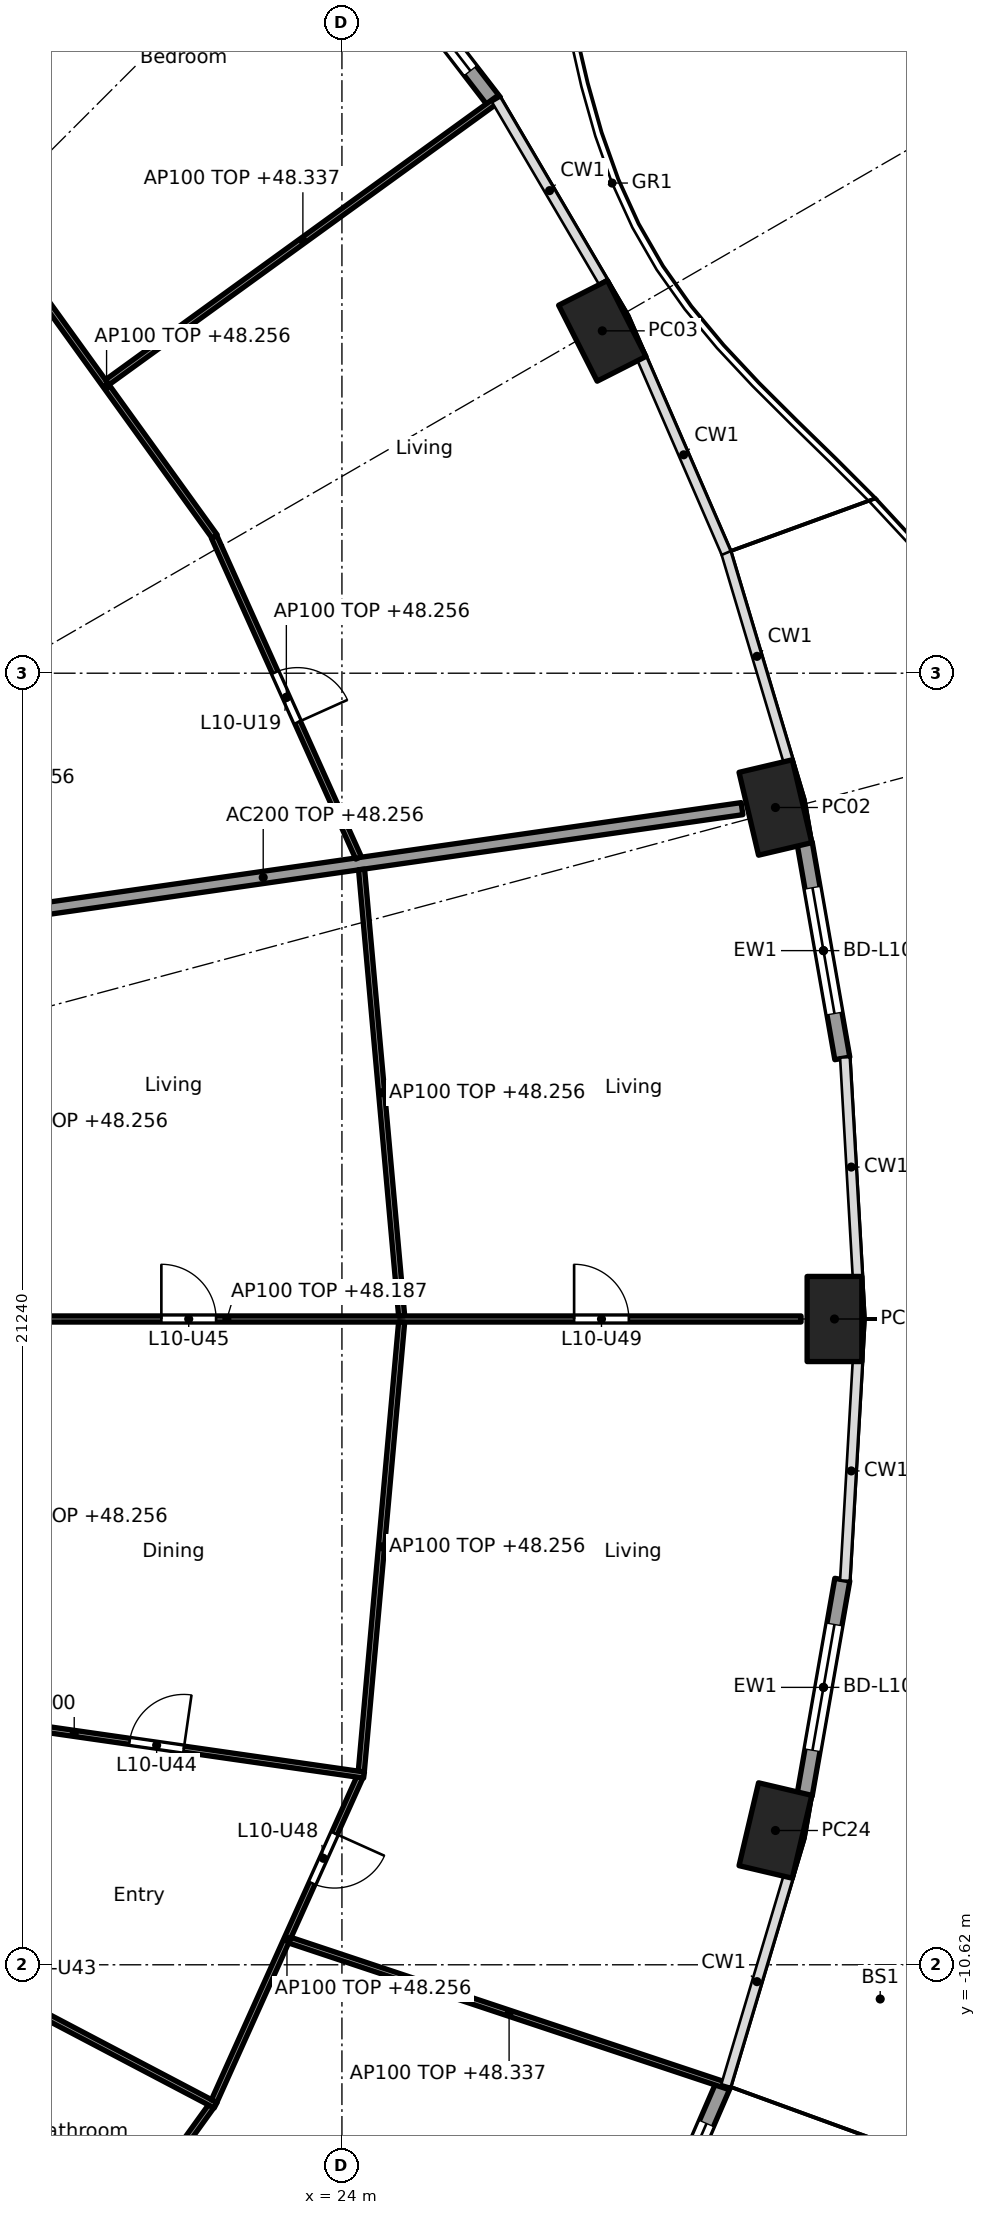
"""IFC4 building model, lengths in metres.
Left out: names, types, materials, properties, quantities, classifications, styles, units other than length and angle.
Written with IfcOpenShell. Run it as: python <this file> out.ifc"""

import sys

from ifc_helpers import new_model, si_unit, direction, frame, frame_2d, origin, origin_2d, place, context, subcontext, project, spatial, rectangle, hollow_rectangle, extrude, element, fill, save


model = new_model("IFC4")
c1 = context("Model", 3, precision=1e-05, world=origin(), true_north=direction((0.0, 1.0)))
c2 = subcontext(c1, "Body", "Model", "MODEL_VIEW")
j1 = project(units=[si_unit("LENGTHUNIT", "METRE"), si_unit("PLANEANGLEUNIT", "RADIAN")], contexts=[c1])
p1 = place(None, origin())
s1 = spatial("IfcSite", under=j1, at=p1, CompositionType="ELEMENT")
p2 = place(p1, origin())
s2 = spatial("IfcBuilding", under=s1, at=p2, CompositionType="ELEMENT")
p3 = place(p2, frame((0.0, 0.0, 45.5)))
s3 = spatial("IfcBuildingStorey", under=s2, at=p3, CompositionType="ELEMENT", Elevation=45.5)
for number, where, z_axis, x_axis in (
    (1, (32.1, 0.0, 0.0), (0.0, 0.0, 1.0), (0.0, 1.0, 0.0)),
    (2, (31.129, 8.412, 0.0), (0.0, 0.0, 1.0), (-0.229, 0.973, 0.0)),
    (3, (28.282, 16.25, 0.0), (0.0, 0.0, 1.0), (-0.452, 0.892, 0.0)),
    (4, (31.129, -8.412, 0.0), (0.0, 0.0, 1.0), (0.229, 0.973, 0.0)),
):
    element("IfcColumn", number, at=place(p3, frame(where, z_axis=z_axis, x_axis=x_axis)), inside=s3, PredefinedType="COLUMN", context=c2, shape_type="SweptSolid", body=[
        extrude(hollow_rectangle(XDim=1.4, YDim=0.9, WallThickness=0.05, at=origin_2d()), origin(), (0.0, 0.0, 1.0), 3.7),
    ])
p4 = place(p3, frame((31.609, 7.83, 0.0), z_axis=(0.0, 0.0, 1.0), x_axis=(0.172217377323, -0.98505897029, 0.0)))
e5 = element("IfcWall", 5, at=p4, inside=s3, PredefinedType="SOLIDWALL", context=c2, shape_type="SweptSolid", body=[
    extrude(rectangle(XDim=3.598, YDim=0.25, at=frame_2d((1.799, 0.0))), origin(), (0.0, 0.0, 1.0), 3.44),
])
p5 = place(p4, frame((0.749, 0.0, 0.0)))
e6 = element("IfcOpeningElement", 6, at=p5, cuts=e5, PredefinedType="OPENING", context=c2, shape_type="SweptSolid", body=[
    extrude(rectangle(XDim=2.1, YDim=2.4, at=frame_2d((1.05, 1.2))), frame((0.0, 0.135, 0.0), z_axis=(0.0, -1.0, 0.0), x_axis=(1.0, 0.0, 0.0)), (0.0, 0.0, 1.0), 0.27),
])
p6 = place(p3, frame((24.434, 22.704, 0.0), z_axis=(0.0, 0.0, 1.0), x_axis=(0.610457147657, -0.792049285635, 0.0)))
e7 = element("IfcWall", 7, at=p6, inside=s3, PredefinedType="SOLIDWALL", context=c2, shape_type="SweptSolid", body=[
    extrude(rectangle(XDim=3.397, YDim=0.25, at=frame_2d((1.699, 0.0))), origin(), (0.0, 0.0, 1.0), 3.44),
])
p7 = place(p6, frame((0.649, 0.0, 0.0)))
e8 = element("IfcOpeningElement", 8, at=p7, cuts=e7, PredefinedType="OPENING", context=c2, shape_type="SweptSolid", body=[
    extrude(rectangle(XDim=2.1, YDim=2.4, at=frame_2d((1.05, 1.2))), frame((0.0, 0.135, 0.0), z_axis=(0.0, -1.0, 0.0), x_axis=(1.0, 0.0, 0.0)), (0.0, 0.0, 1.0), 0.27),
])
p8 = place(p3, frame((30.278, -12.579, 0.0), z_axis=(0.0, 0.0, 1.0), x_axis=(-0.397624958345, -0.917548032803, 0.0)))
e9 = element("IfcWall", 9, at=p8, inside=s3, PredefinedType="SOLIDWALL", context=c2, shape_type="SweptSolid", body=[
    extrude(rectangle(XDim=3.52, YDim=0.25, at=frame_2d((1.76, 0.0))), origin(), (0.0, 0.0, 1.0), 3.44),
])
p9 = place(p8, frame((0.71, 0.0, 0.0)))
e10 = element("IfcOpeningElement", 10, at=p9, cuts=e9, PredefinedType="OPENING", context=c2, shape_type="SweptSolid", body=[
    extrude(rectangle(XDim=2.1, YDim=2.4, at=frame_2d((1.05, 1.2))), frame((0.0, 0.135, 0.0), z_axis=(0.0, -1.0, 0.0), x_axis=(1.0, 0.0, 0.0)), (0.0, 0.0, 1.0), 0.27),
])
p10 = place(p3, frame((32.229, -4.286, 0.0), z_axis=(0.0, 0.0, 1.0), x_axis=(-0.172217377323, -0.98505897029, 0.0)))
e11 = element("IfcWall", 11, at=p10, inside=s3, PredefinedType="SOLIDWALL", context=c2, shape_type="SweptSolid", body=[
    extrude(rectangle(XDim=3.598, YDim=0.25, at=frame_2d((1.799, 0.0))), origin(), (0.0, 0.0, 1.0), 3.44),
])
p11 = place(p10, frame((0.749, 0.0, 0.0)))
e12 = element("IfcOpeningElement", 12, at=p11, cuts=e11, PredefinedType="OPENING", context=c2, shape_type="SweptSolid", body=[
    extrude(rectangle(XDim=2.1, YDim=2.4, at=frame_2d((1.05, 1.2))), frame((0.0, 0.135, 0.0), z_axis=(0.0, -1.0, 0.0), x_axis=(1.0, 0.0, 0.0)), (0.0, 0.0, 1.0), 0.27),
])
p12 = place(p3, frame((14.832, 6.13, 0.0), z_axis=(0.0, 0.0, 1.0), x_axis=(0.989836541293, 0.142209779978, 0.0)))
e13 = element("IfcWall", 13, at=p12, inside=s3, PredefinedType="PARTITIONING", context=c2, shape_type="SweptSolid", body=[
    extrude(rectangle(XDim=15.909, YDim=0.2, at=frame_2d((7.955, 0.0))), origin(), (0.0, 0.0, 1.0), 2.756),
])
p13 = place(p3, frame((12.665, 0.0, 0.0), z_axis=(0.0, 0.0, 1.0), x_axis=(1.0, 0.0, 0.0)))
e14 = element("IfcWall", 14, at=p13, inside=s3, PredefinedType="PARTITIONING", context=c2, shape_type="SweptSolid", body=[
    extrude(rectangle(XDim=18.885, YDim=0.1, at=frame_2d((9.443, 0.0))), origin(), (0.0, 0.0, 1.0), 2.687),
])
p14 = place(p13, frame((2.205, 0.0, 0.0)))
e15 = element("IfcOpeningElement", 15, at=p14, cuts=e14, PredefinedType="OPENING", context=c2, shape_type="SweptSolid", body=[
    extrude(rectangle(XDim=0.9, YDim=2.1, at=frame_2d((0.45, 1.05))), frame((0.0, 0.06, 0.0), z_axis=(0.0, -1.0, 0.0), x_axis=(1.0, 0.0, 0.0)), (0.0, 0.0, 1.0), 0.12),
])
p15 = place(p13, frame((8.366, 0.0, 0.0)))
e16 = element("IfcOpeningElement", 16, at=p15, cuts=e14, PredefinedType="OPENING", context=c2, shape_type="SweptSolid", body=[
    extrude(rectangle(XDim=0.9, YDim=2.1, at=frame_2d((0.45, 1.05))), frame((0.0, 0.06, 0.0), z_axis=(0.0, -1.0, 0.0), x_axis=(1.0, 0.0, 0.0)), (0.0, 0.0, 1.0), 0.12),
])
p16 = place(p13, frame((15.154, 0.0, 0.0)))
e17 = element("IfcOpeningElement", 17, at=p16, cuts=e14, PredefinedType="OPENING", context=c2, shape_type="SweptSolid", body=[
    extrude(rectangle(XDim=0.9, YDim=2.1, at=frame_2d((0.45, 1.05))), frame((0.0, 0.06, 0.0), z_axis=(0.0, -1.0, 0.0), x_axis=(1.0, 0.0, 0.0)), (0.0, 0.0, 1.0), 0.12),
])
p17 = place(p3, frame((24.982, 0.05, 0.0), z_axis=(0.0, 0.0, 1.0), x_axis=(-0.08944290521, 0.995991951126, 0.0)))
e18 = element("IfcWall", 18, at=p17, inside=s3, PredefinedType="PARTITIONING", context=c2, shape_type="SweptSolid", body=[
    extrude(rectangle(XDim=7.373, YDim=0.1, at=frame_2d((3.686, 0.0))), origin(), (0.0, 0.0, 1.0), 2.756),
])
p18 = place(p3, frame((24.982, -0.05, 0.0), z_axis=(0.0, 0.0, 1.0), x_axis=(-0.089432471274, -0.995992888068, 0.0)))
e19 = element("IfcWall", 19, at=p18, inside=s3, PredefinedType="PARTITIONING", context=c2, shape_type="SweptSolid", body=[
    extrude(rectangle(XDim=7.423, YDim=0.1, at=frame_2d((3.711, 0.0))), origin(), (0.0, 0.0, 1.0), 2.756),
])
p19 = place(p3, frame((24.273, 7.584, 0.0), z_axis=(0.0, 0.0, 1.0), x_axis=(-0.410201529109, 0.911994904326, 0.0)))
e20 = element("IfcWall", 20, at=p19, inside=s3, PredefinedType="PARTITIONING", context=c2, shape_type="SweptSolid", body=[
    extrude(rectangle(XDim=5.787, YDim=0.1, at=frame_2d((2.894, 0.0))), origin(), (0.0, 0.0, 1.0), 2.756),
])
p20 = place(p19, frame((2.444, 0.0, 0.0)))
e21 = element("IfcOpeningElement", 21, at=p20, cuts=e20, PredefinedType="OPENING", context=c2, shape_type="SweptSolid", body=[
    extrude(rectangle(XDim=0.9, YDim=2.1, at=frame_2d((0.45, 1.05))), frame((0.0, 0.06, 0.0), z_axis=(0.0, -1.0, 0.0), x_axis=(1.0, 0.0, 0.0)), (0.0, 0.0, 1.0), 0.12),
])
p21 = place(p3, frame((21.908, 12.866, 0.0), z_axis=(0.0, 0.0, 1.0), x_axis=(-0.584558392935, 0.811351640936, 0.0)))
e22 = element("IfcWall", 22, at=p21, inside=s3, PredefinedType="PARTITIONING", context=c2, shape_type="SweptSolid", body=[
    extrude(rectangle(XDim=6.084, YDim=0.1, at=frame_2d((3.042, 0.0))), origin(), (0.0, 0.0, 1.0), 2.756),
])
p22 = place(p3, frame((20.141, 15.405, 0.0), z_axis=(0.0, 0.0, 1.0), x_axis=(0.809834895779, 0.58665785734, 0.0)))
e23 = element("IfcWall", 23, at=p22, inside=s3, PredefinedType="PARTITIONING", context=c2, shape_type="SweptSolid", body=[
    extrude(rectangle(XDim=7.945, YDim=0.1, at=frame_2d((3.973, 0.0))), origin(), (0.0, 0.0, 1.0), 2.837),
])
p23 = place(p3, frame((16.142, 19.858, 0.0), z_axis=(0.0, 0.0, 1.0), x_axis=(0.628738066508, 0.777617157555, 0.0)))
e24 = element("IfcWall", 24, at=p23, inside=s3, PredefinedType="PARTITIONING", context=c2, shape_type="SweptSolid", body=[
    extrude(rectangle(XDim=8.091, YDim=0.1, at=frame_2d((4.045, 0.0))), origin(), (0.0, 0.0, 1.0), 2.837),
])
p24 = place(p3, frame((18.293, -17.884, 0.0), z_axis=(0.0, 0.0, 1.0), x_axis=(0.584558392935, 0.811351640936, 0.0)))
e25 = element("IfcWall", 25, at=p24, inside=s3, PredefinedType="PARTITIONING", context=c2, shape_type="SweptSolid", body=[
    extrude(rectangle(XDim=6.084, YDim=0.1, at=frame_2d((3.042, 0.0))), origin(), (0.0, 0.0, 1.0), 2.756),
])
p25 = place(p3, frame((14.329, -11.221, 0.0), z_axis=(0.0, 0.0, 1.0), x_axis=(0.810671130917, -0.58550176558, 0.0)))
e26 = element("IfcWall", 26, at=p25, inside=s3, PredefinedType="PARTITIONING", context=c2, shape_type="SweptSolid", body=[
    extrude(rectangle(XDim=15.106, YDim=0.1, at=frame_2d((7.553, 0.0))), origin(), (0.0, 0.0, 1.0), 2.837),
])
p26 = place(p25, frame((10.659, 0.0, 0.0)))
e27 = element("IfcOpeningElement", 27, at=p26, cuts=e26, PredefinedType="OPENING", context=c2, shape_type="SweptSolid", body=[
    extrude(rectangle(XDim=0.9, YDim=2.1, at=frame_2d((0.45, 1.05))), frame((0.0, 0.06, 0.0), z_axis=(0.0, -1.0, 0.0), x_axis=(1.0, 0.0, 0.0)), (0.0, 0.0, 1.0), 0.12),
])
p27 = place(p3, frame((10.813, -7.091, 0.0), z_axis=(0.0, 0.0, 1.0), x_axis=(0.885182649479, -0.465243674928, 0.0)))
e28 = element("IfcWall", 28, at=p27, inside=s3, PredefinedType="PARTITIONING", context=c2, shape_type="SweptSolid", body=[
    extrude(rectangle(XDim=12.551, YDim=0.1, at=frame_2d((6.275, 0.0))), origin(), (0.0, 0.0, 1.0), 2.687),
])
p28 = place(p27, frame((0.539, 0.0, 0.0)))
e29 = element("IfcOpeningElement", 29, at=p28, cuts=e28, PredefinedType="OPENING", context=c2, shape_type="SweptSolid", body=[
    extrude(rectangle(XDim=0.9, YDim=2.1, at=frame_2d((0.45, 1.05))), frame((0.0, 0.06, 0.0), z_axis=(0.0, -1.0, 0.0), x_axis=(1.0, 0.0, 0.0)), (0.0, 0.0, 1.0), 0.12),
])
p29 = place(p27, frame((8.494, 0.0, 0.0)))
e30 = element("IfcOpeningElement", 30, at=p29, cuts=e28, PredefinedType="OPENING", context=c2, shape_type="SweptSolid", body=[
    extrude(rectangle(XDim=0.9, YDim=2.1, at=frame_2d((0.45, 1.05))), frame((0.0, 0.06, 0.0), z_axis=(0.0, -1.0, 0.0), x_axis=(1.0, 0.0, 0.0)), (0.0, 0.0, 1.0), 0.12),
])
p30 = place(p3, frame((21.899, -12.861, 0.0), z_axis=(0.0, 0.0, 1.0), x_axis=(0.410197710154, 0.911996622025, 0.0)))
e31 = element("IfcWall", 31, at=p30, inside=s3, PredefinedType="PARTITIONING", context=c2, shape_type="SweptSolid", body=[
    extrude(rectangle(XDim=5.837, YDim=0.1, at=frame_2d((2.918, 0.0))), origin(), (0.0, 0.0, 1.0), 2.756),
])
p31 = place(p30, frame((3.928, 0.0, 0.0)))
e32 = element("IfcOpeningElement", 32, at=p31, cuts=e31, PredefinedType="OPENING", context=c2, shape_type="SweptSolid", body=[
    extrude(rectangle(XDim=0.9, YDim=2.1, at=frame_2d((0.45, 1.05))), frame((0.0, 0.06, 0.0), z_axis=(0.0, -1.0, 0.0), x_axis=(1.0, 0.0, 0.0)), (0.0, 0.0, 1.0), 0.12),
])
p32 = place(p3, frame((23.144, -10.216, 0.0), z_axis=(0.0, 0.0, 1.0), x_axis=(0.948811715359, -0.315842253027, 0.0)))
e33 = element("IfcWall", 33, at=p32, inside=s3, PredefinedType="PARTITIONING", context=c2, shape_type="SweptSolid", body=[
    extrude(rectangle(XDim=7.6, YDim=0.1, at=frame_2d((3.8, 0.0))), origin(), (0.0, 0.0, 1.0), 2.837),
])
p33 = place(p3, frame((14.832, -6.13, 0.0), z_axis=(0.0, 0.0, 1.0), x_axis=(0.989837122016, -0.142205737856, 0.0)))
e34 = element("IfcWall", 34, at=p33, inside=s3, PredefinedType="PARTITIONING", context=c2, shape_type="SweptSolid", body=[
    extrude(rectangle(XDim=9.63, YDim=0.1, at=frame_2d((4.815, 0.0))), origin(), (0.0, 0.0, 1.0), 3.44),
])
p34 = place(p33, frame((1.182, 0.0, 0.0)))
e35 = element("IfcOpeningElement", 35, at=p34, cuts=e34, PredefinedType="OPENING", context=c2, shape_type="SweptSolid", body=[
    extrude(rectangle(XDim=0.9, YDim=2.1, at=frame_2d((0.45, 1.05))), frame((0.0, 0.06, 0.0), z_axis=(0.0, -1.0, 0.0), x_axis=(1.0, 0.0, 0.0)), (0.0, 0.0, 1.0), 0.12),
])
p35 = place(p33, frame((5.734, 0.0, 0.0)))
e36 = element("IfcOpeningElement", 36, at=p35, cuts=e34, PredefinedType="OPENING", context=c2, shape_type="SweptSolid", body=[
    extrude(rectangle(XDim=0.9, YDim=2.1, at=frame_2d((0.45, 1.05))), frame((0.0, 0.06, 0.0), z_axis=(0.0, -1.0, 0.0), x_axis=(1.0, 0.0, 0.0)), (0.0, 0.0, 1.0), 0.12),
])
p36 = place(p5, origin())
e37 = element("IfcDoor", 37, at=p36, inside=s3, OperationType="SLIDING_TO_LEFT", PredefinedType="DOOR", context=c2, shape_type="SweptSolid", body=[
    extrude(rectangle(XDim=2.1, YDim=2.4, at=frame_2d((1.05, 1.2))), frame((0.0, 0.025, 0.0), z_axis=(0.0, -1.0, 0.0), x_axis=(1.0, 0.0, 0.0)), (0.0, 0.0, 1.0), 0.05),
])
fill(e6, e37)
p37 = place(p7, origin())
e38 = element("IfcDoor", 38, at=p37, inside=s3, OperationType="SLIDING_TO_LEFT", PredefinedType="DOOR", context=c2, shape_type="SweptSolid", body=[
    extrude(rectangle(XDim=2.1, YDim=2.4, at=frame_2d((1.05, 1.2))), frame((0.0, 0.025, 0.0), z_axis=(0.0, -1.0, 0.0), x_axis=(1.0, 0.0, 0.0)), (0.0, 0.0, 1.0), 0.05),
])
fill(e8, e38)
p38 = place(p9, origin())
e39 = element("IfcDoor", 39, at=p38, inside=s3, OperationType="SLIDING_TO_LEFT", PredefinedType="DOOR", context=c2, shape_type="SweptSolid", body=[
    extrude(rectangle(XDim=2.1, YDim=2.4, at=frame_2d((1.05, 1.2))), frame((0.0, 0.025, 0.0), z_axis=(0.0, -1.0, 0.0), x_axis=(1.0, 0.0, 0.0)), (0.0, 0.0, 1.0), 0.05),
])
fill(e10, e39)
p39 = place(p11, origin())
e40 = element("IfcDoor", 40, at=p39, inside=s3, OperationType="SLIDING_TO_LEFT", PredefinedType="DOOR", context=c2, shape_type="SweptSolid", body=[
    extrude(rectangle(XDim=2.1, YDim=2.4, at=frame_2d((1.05, 1.2))), frame((0.0, 0.025, 0.0), z_axis=(0.0, -1.0, 0.0), x_axis=(1.0, 0.0, 0.0)), (0.0, 0.0, 1.0), 0.05),
])
fill(e12, e40)
p40 = place(p20, frame((0.9, 0.0, 0.0), x_axis=(-1.0, 0.0, 0.0)))
e41 = element("IfcDoor", 41, at=p40, inside=s3, OperationType="SINGLE_SWING_RIGHT", PredefinedType="DOOR", context=c2, shape_type="SweptSolid", body=[
    extrude(rectangle(XDim=0.9, YDim=2.1, at=frame_2d((0.45, 1.05))), frame((0.0, 0.025, 0.0), z_axis=(0.0, -1.0, 0.0), x_axis=(1.0, 0.0, 0.0)), (0.0, 0.0, 1.0), 0.05),
])
fill(e21, e41)
p41 = place(p35, origin())
e42 = element("IfcDoor", 42, at=p41, inside=s3, OperationType="SINGLE_SWING_RIGHT", PredefinedType="DOOR", context=c2, shape_type="SweptSolid", body=[
    extrude(rectangle(XDim=0.9, YDim=2.1, at=frame_2d((0.45, 1.05))), frame((0.0, 0.025, 0.0), z_axis=(0.0, -1.0, 0.0), x_axis=(1.0, 0.0, 0.0)), (0.0, 0.0, 1.0), 0.05),
])
fill(e36, e42)
p42 = place(p15, origin())
e43 = element("IfcDoor", 43, at=p42, inside=s3, OperationType="SINGLE_SWING_LEFT", PredefinedType="DOOR", context=c2, shape_type="SweptSolid", body=[
    extrude(rectangle(XDim=0.9, YDim=2.1, at=frame_2d((0.45, 1.05))), frame((0.0, 0.025, 0.0), z_axis=(0.0, -1.0, 0.0), x_axis=(1.0, 0.0, 0.0)), (0.0, 0.0, 1.0), 0.05),
])
fill(e16, e43)
p43 = place(p31, frame((0.9, 0.0, 0.0), x_axis=(-1.0, 0.0, 0.0)))
e44 = element("IfcDoor", 44, at=p43, inside=s3, OperationType="SINGLE_SWING_LEFT", PredefinedType="DOOR", context=c2, shape_type="SweptSolid", body=[
    extrude(rectangle(XDim=0.9, YDim=2.1, at=frame_2d((0.45, 1.05))), frame((0.0, 0.025, 0.0), z_axis=(0.0, -1.0, 0.0), x_axis=(1.0, 0.0, 0.0)), (0.0, 0.0, 1.0), 0.05),
])
fill(e32, e44)
p44 = place(p16, origin())
e45 = element("IfcDoor", 45, at=p44, inside=s3, OperationType="SINGLE_SWING_LEFT", PredefinedType="DOOR", context=c2, shape_type="SweptSolid", body=[
    extrude(rectangle(XDim=0.9, YDim=2.1, at=frame_2d((0.45, 1.05))), frame((0.0, 0.025, 0.0), z_axis=(0.0, -1.0, 0.0), x_axis=(1.0, 0.0, 0.0)), (0.0, 0.0, 1.0), 0.05),
])
fill(e17, e45)
save(model, sys.argv[1])
